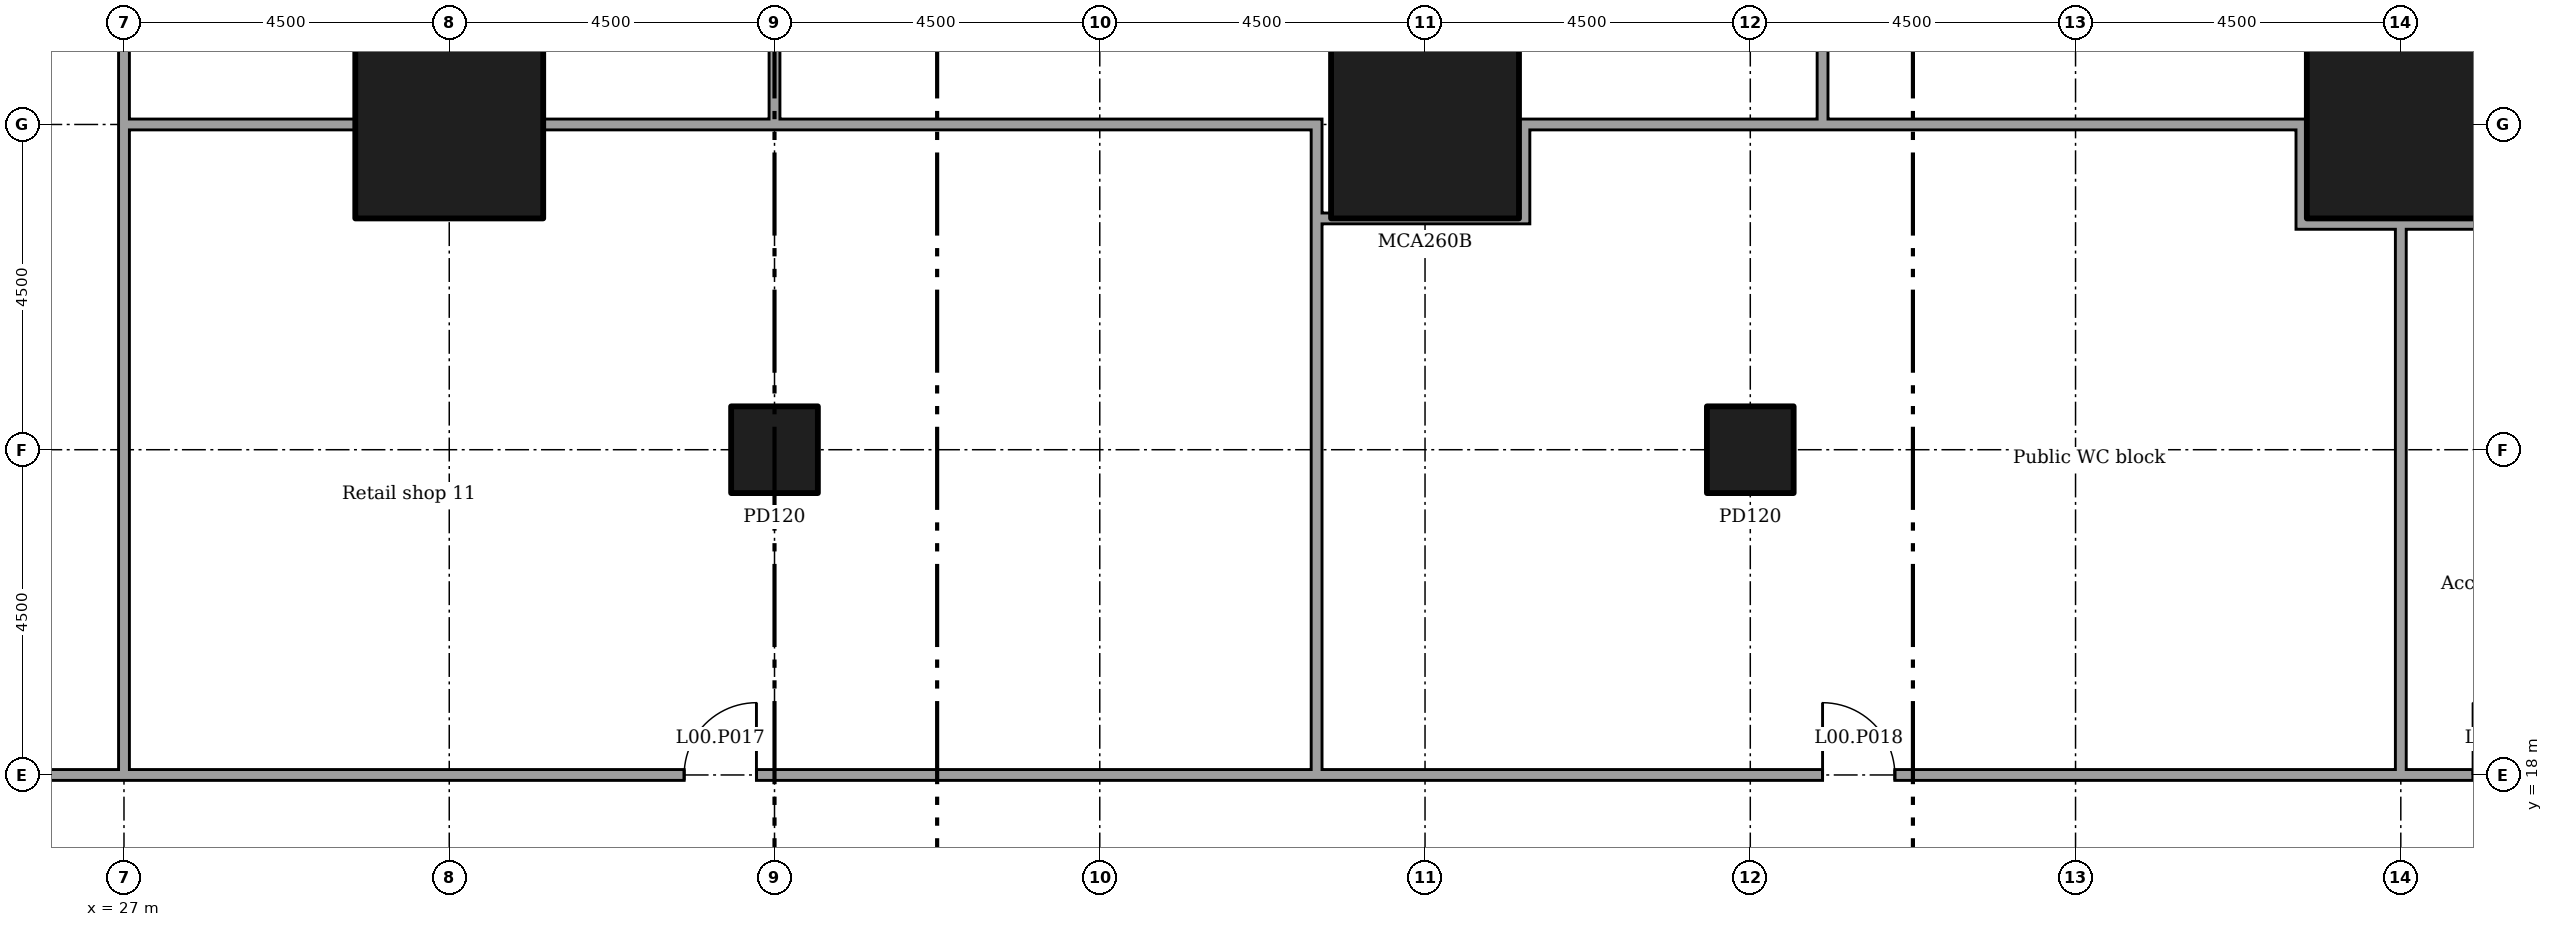
"""IFC4 building model, lengths in metres.
Left out: names, types, materials, properties, quantities, classifications, styles, units other than length and angle.
Written with IfcOpenShell. Run it as: python <this file> out.ifc"""

import sys

from ifc_helpers import new_model, si_unit, direction, frame, frame_2d, origin, origin_2d, place, context, subcontext, project, spatial, rectangle, extrude, element, fill, save


model = new_model("IFC4")
c1 = context("Model", 3, precision=1e-05, world=origin(), true_north=direction((0.0, 1.0)))
c2 = subcontext(c1, "Body", "Model", "MODEL_VIEW")
j1 = project(units=[si_unit("LENGTHUNIT", "METRE"), si_unit("PLANEANGLEUNIT", "RADIAN")], contexts=[c1])
p1 = place(None, origin())
s1 = spatial("IfcSite", under=j1, at=p1, CompositionType="ELEMENT")
p2 = place(p1, origin())
s2 = spatial("IfcBuilding", under=s1, at=p2, CompositionType="ELEMENT")
p3 = place(p2, origin())
s3 = spatial("IfcBuildingStorey", under=s2, at=p3, CompositionType="ELEMENT", Elevation=0.0)
for number, where in (
    (1, (31.5, 27.0, 0.0)),
    (2, (45.0, 27.0, 0.0)),
    (3, (58.5, 27.0, 0.0)),
):
    element("IfcColumn", number, at=place(p3, frame(where)), inside=s3, PredefinedType="COLUMN", context=c2, shape_type="SweptSolid", body=[
        extrude(rectangle(XDim=2.6, YDim=2.6, at=origin_2d()), origin(), (0.0, 0.0, 1.0), 6.0),
    ])
for number, where in (
    (4, (36.0, 22.5, 0.0)),
    (5, (49.5, 22.5, 0.0)),
):
    element("IfcColumn", number, at=place(p3, frame(where)), inside=s3, PredefinedType="COLUMN", context=c2, shape_type="SweptSolid", body=[
        extrude(rectangle(XDim=1.2, YDim=1.2, at=origin_2d()), origin(), (0.0, 0.0, 1.0), 6.0),
    ])
p4 = place(p3, frame((18.075, 18.0, 0.0)))
e6 = element("IfcWall", 6, at=p4, inside=s3, PredefinedType="PARTITIONING", context=c2, shape_type="SweptSolid", body=[
    extrude(rectangle(XDim=9.0, YDim=0.15, at=frame_2d((4.5, 0.0))), origin(), (0.0, 0.0, 1.0), 5.55),
])
p5 = place(p3, frame((27.0, 18.0, 0.0)))
e7 = element("IfcWall", 7, at=p5, inside=s3, PredefinedType="PARTITIONING", context=c2, shape_type="SweptSolid", body=[
    extrude(rectangle(XDim=16.575, YDim=0.15, at=frame_2d((8.288, 0.0))), origin(), (0.0, 0.0, 1.0), 5.55),
])
p6 = place(p5, frame((7.75, 0.0, 0.0)))
e8 = element("IfcOpeningElement", 8, at=p6, cuts=e7, PredefinedType="OPENING", context=c2, shape_type="SweptSolid", body=[
    extrude(rectangle(XDim=1.0, YDim=2.1, at=frame_2d((0.5, 1.05))), frame((0.0, 0.085, 0.0), z_axis=(0.0, -1.0, 0.0), x_axis=(1.0, 0.0, 0.0)), (0.0, 0.0, 1.0), 0.17),
])
p7 = place(p3, frame((43.5, 18.0, 0.0)))
e9 = element("IfcWall", 9, at=p7, inside=s3, PredefinedType="PARTITIONING", context=c2, shape_type="SweptSolid", body=[
    extrude(rectangle(XDim=15.075, YDim=0.15, at=frame_2d((7.538, 0.0))), origin(), (0.0, 0.0, 1.0), 5.55),
])
p8 = place(p7, frame((7.0, 0.0, 0.0)))
e10 = element("IfcOpeningElement", 10, at=p8, cuts=e9, PredefinedType="OPENING", context=c2, shape_type="SweptSolid", body=[
    extrude(rectangle(XDim=1.0, YDim=2.1, at=frame_2d((0.5, 1.05))), frame((0.0, 0.085, 0.0), z_axis=(0.0, -1.0, 0.0), x_axis=(1.0, 0.0, 0.0)), (0.0, 0.0, 1.0), 0.17),
])
p9 = place(p3, frame((58.5, 18.0, 0.0)))
e11 = element("IfcWall", 11, at=p9, inside=s3, PredefinedType="PARTITIONING", context=c2, shape_type="SweptSolid", body=[
    extrude(rectangle(XDim=3.075, YDim=0.15, at=frame_2d((1.538, 0.0))), origin(), (0.0, 0.0, 1.0), 5.55),
])
p10 = place(p9, frame((1.0, 0.0, 0.0)))
e12 = element("IfcOpeningElement", 12, at=p10, cuts=e11, PredefinedType="OPENING", context=c2, shape_type="SweptSolid", body=[
    extrude(rectangle(XDim=1.0, YDim=2.1, at=frame_2d((0.5, 1.05))), frame((0.0, 0.085, 0.0), z_axis=(0.0, -1.0, 0.0), x_axis=(1.0, 0.0, 0.0)), (0.0, 0.0, 1.0), 0.17),
])
p11 = place(p3, frame((27.0, 18.075, 0.0), z_axis=(0.0, 0.0, 1.0), x_axis=(0.0, 1.0, 0.0)))
e13 = element("IfcWall", 13, at=p11, inside=s3, PredefinedType="PARTITIONING", context=c2, shape_type="SweptSolid", body=[
    extrude(rectangle(XDim=9.0, YDim=0.15, at=frame_2d((4.5, 0.0))), origin(), (0.0, 0.0, 1.0), 5.55),
])
p12 = place(p3, frame((27.0, 27.0, 0.0), z_axis=(0.0, 0.0, 1.0), x_axis=(0.0, 1.0, 0.0)))
e14 = element("IfcWall", 14, at=p12, inside=s3, PredefinedType="PARTITIONING", context=c2, shape_type="SweptSolid", body=[
    extrude(rectangle(XDim=3.205, YDim=0.15, at=frame_2d((1.603, 0.0))), origin(), (0.0, 0.0, 1.0), 5.55),
])
p13 = place(p3, frame((43.5, 18.075, 0.0), z_axis=(0.0, 0.0, 1.0), x_axis=(0.0, 1.0, 0.0)))
e15 = element("IfcWall", 15, at=p13, inside=s3, PredefinedType="PARTITIONING", context=c2, shape_type="SweptSolid", body=[
    extrude(rectangle(XDim=7.7, YDim=0.15, at=frame_2d((3.85, 0.0))), origin(), (0.0, 0.0, 1.0), 5.55),
])
p14 = place(p3, frame((27.075, 27.0, 0.0)))
e16 = element("IfcWall", 16, at=p14, inside=s3, PredefinedType="PARTITIONING", context=c2, shape_type="SweptSolid", body=[
    extrude(rectangle(XDim=3.13, YDim=0.15, at=frame_2d((1.565, 0.0))), origin(), (0.0, 0.0, 1.0), 5.55),
])
p15 = place(p3, frame((32.795, 27.0, 0.0)))
e17 = element("IfcWall", 17, at=p15, inside=s3, PredefinedType="PARTITIONING", context=c2, shape_type="SweptSolid", body=[
    extrude(rectangle(XDim=3.28, YDim=0.15, at=frame_2d((1.64, 0.0))), origin(), (0.0, 0.0, 1.0), 5.55),
])
p16 = place(p3, frame((43.5, 25.7, 0.0), z_axis=(0.0, 0.0, 1.0), x_axis=(0.0, 1.0, 0.0)))
e18 = element("IfcWall", 18, at=p16, inside=s3, PredefinedType="PARTITIONING", context=c2, shape_type="SweptSolid", body=[
    extrude(rectangle(XDim=1.375, YDim=0.15, at=frame_2d((0.688, 0.0))), origin(), (0.0, 0.0, 1.0), 5.55),
])
p17 = place(p3, frame((36.0, 27.0, 0.0)))
e19 = element("IfcWall", 19, at=p17, inside=s3, PredefinedType="PARTITIONING", context=c2, shape_type="SweptSolid", body=[
    extrude(rectangle(XDim=7.425, YDim=0.15, at=frame_2d((3.712, 0.0))), origin(), (0.0, 0.0, 1.0), 5.55),
])
p18 = place(p3, frame((58.5, 18.075, 0.0), z_axis=(0.0, 0.0, 1.0), x_axis=(0.0, 1.0, 0.0)))
e20 = element("IfcWall", 20, at=p18, inside=s3, PredefinedType="PARTITIONING", context=c2, shape_type="SweptSolid", body=[
    extrude(rectangle(XDim=7.625, YDim=0.15, at=frame_2d((3.812, 0.0))), origin(), (0.0, 0.0, 1.0), 5.55),
])
p19 = place(p3, frame((46.375, 25.625, 0.0), z_axis=(0.0, 0.0, 1.0), x_axis=(0.0, 1.0, 0.0)))
e21 = element("IfcWall", 21, at=p19, inside=s3, PredefinedType="PARTITIONING", context=c2, shape_type="SweptSolid", body=[
    extrude(rectangle(XDim=1.45, YDim=0.15, at=frame_2d((0.725, 0.0))), origin(), (0.0, 0.0, 1.0), 5.55),
])
p20 = place(p3, frame((43.575, 25.7, 0.0)))
e22 = element("IfcWall", 22, at=p20, inside=s3, PredefinedType="PARTITIONING", context=c2, shape_type="SweptSolid", body=[
    extrude(rectangle(XDim=2.725, YDim=0.15, at=frame_2d((1.363, 0.0))), origin(), (0.0, 0.0, 1.0), 5.55),
])
p21 = place(p3, frame((46.45, 27.0, 0.0)))
e23 = element("IfcWall", 23, at=p21, inside=s3, PredefinedType="PARTITIONING", context=c2, shape_type="SweptSolid", body=[
    extrude(rectangle(XDim=4.125, YDim=0.15, at=frame_2d((2.062, 0.0))), origin(), (0.0, 0.0, 1.0), 5.55),
])
p22 = place(p3, frame((57.125, 25.55, 0.0), z_axis=(0.0, 0.0, 1.0), x_axis=(0.0, 1.0, 0.0)))
e24 = element("IfcWall", 24, at=p22, inside=s3, PredefinedType="PARTITIONING", context=c2, shape_type="SweptSolid", body=[
    extrude(rectangle(XDim=1.525, YDim=0.15, at=frame_2d((0.762, 0.0))), origin(), (0.0, 0.0, 1.0), 5.55),
])
p23 = place(p3, frame((57.2, 25.625, 0.0)))
e25 = element("IfcWall", 25, at=p23, inside=s3, PredefinedType="PARTITIONING", context=c2, shape_type="SweptSolid", body=[
    extrude(rectangle(XDim=1.225, YDim=0.15, at=frame_2d((0.613, 0.0))), origin(), (0.0, 0.0, 1.0), 5.55),
])
p24 = place(p3, frame((50.5, 27.0, 0.0)))
e26 = element("IfcWall", 26, at=p24, inside=s3, PredefinedType="PARTITIONING", context=c2, shape_type="SweptSolid", body=[
    extrude(rectangle(XDim=6.55, YDim=0.15, at=frame_2d((3.275, 0.0))), origin(), (0.0, 0.0, 1.0), 5.55),
])
p25 = place(p3, frame((58.425, 25.625, 0.0)))
e27 = element("IfcWall", 27, at=p25, inside=s3, PredefinedType="PARTITIONING", context=c2, shape_type="SweptSolid", body=[
    extrude(rectangle(XDim=1.375, YDim=0.15, at=frame_2d((0.688, 0.0))), origin(), (0.0, 0.0, 1.0), 5.55),
])
for number, where, z_axis, x_axis in (
    (28, (36.0, 27.075, 0.0), (0.0, 0.0, 1.0), (0.0, 1.0, 0.0)),
    (29, (50.5, 27.075, 0.0), (0.0, 0.0, 1.0), (0.0, 1.0, 0.0)),
):
    element("IfcWall", number, at=place(p3, frame(where, z_axis=z_axis, x_axis=x_axis)), inside=s3, PredefinedType="PARTITIONING", context=c2, shape_type="SweptSolid", body=[
        extrude(rectangle(XDim=9.0, YDim=0.15, at=frame_2d((4.5, 0.0))), origin(), (0.0, 0.0, 1.0), 5.55),
    ])
p26 = place(p6, origin())
e30 = element("IfcDoor", 30, at=p26, inside=s3, OperationType="SINGLE_SWING_LEFT", PredefinedType="DOOR", context=c2, shape_type="SweptSolid", body=[
    extrude(rectangle(XDim=1.0, YDim=2.1, at=frame_2d((0.5, 1.05))), frame((0.0, 0.025, 0.0), z_axis=(0.0, -1.0, 0.0), x_axis=(1.0, 0.0, 0.0)), (0.0, 0.0, 1.0), 0.05),
])
fill(e8, e30)
p27 = place(p8, origin())
e31 = element("IfcDoor", 31, at=p27, inside=s3, OperationType="SINGLE_SWING_RIGHT", PredefinedType="DOOR", context=c2, shape_type="SweptSolid", body=[
    extrude(rectangle(XDim=1.0, YDim=2.1, at=frame_2d((0.5, 1.05))), frame((0.0, 0.025, 0.0), z_axis=(0.0, -1.0, 0.0), x_axis=(1.0, 0.0, 0.0)), (0.0, 0.0, 1.0), 0.05),
])
fill(e10, e31)
save(model, sys.argv[1])
